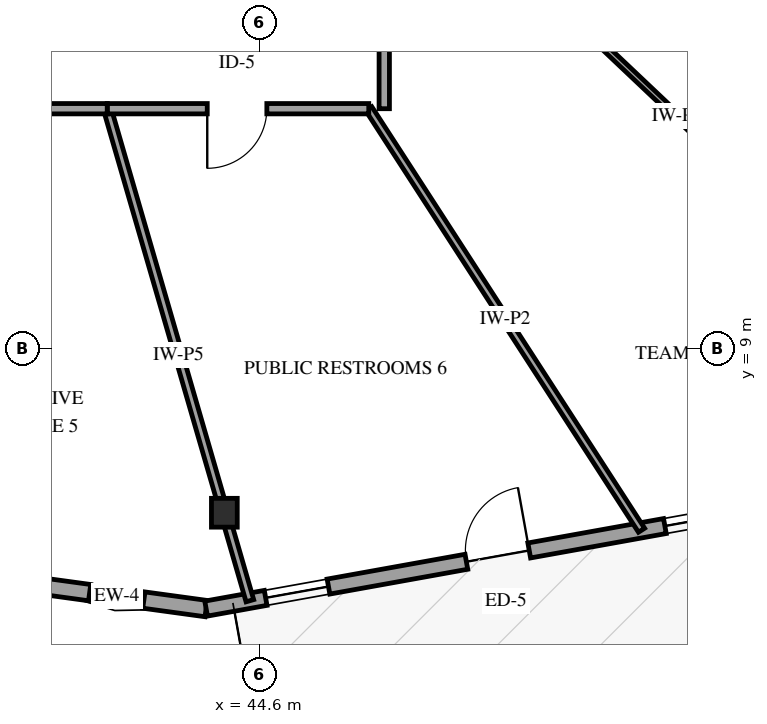
"""IFC4 building model, lengths in metres.
Left out: names, types, materials, properties, quantities, classifications, styles, units other than length and angle.
Written with IfcOpenShell. Run it as: python <this file> out.ifc"""

import sys

from ifc_helpers import new_model, si_unit, direction, frame, frame_2d, origin, origin_2d, place, context, subcontext, project, spatial, rectangle, i_section, extrude, element, fill, save


model = new_model("IFC4")
c1 = context("Model", 3, precision=1e-05, world=origin(), true_north=direction((0.0, 1.0)))
c2 = subcontext(c1, "Body", "Model", "MODEL_VIEW")
j1 = project(units=[si_unit("LENGTHUNIT", "METRE"), si_unit("PLANEANGLEUNIT", "RADIAN")], contexts=[c1])
p1 = place(None, origin())
s1 = spatial("IfcSite", under=j1, at=p1, CompositionType="ELEMENT")
p2 = place(p1, origin())
s2 = spatial("IfcBuilding", under=s1, at=p2, CompositionType="ELEMENT")
p3 = place(p2, frame((0.0, 0.0, 66.6)))
s3 = spatial("IfcBuildingStorey", under=s2, at=p3, CompositionType="ELEMENT", Elevation=66.6)
p4 = place(p3, frame((44.02, 6.306, 0.0), z_axis=(0.0, 0.0, 1.0), x_axis=(1.0, 0.0, 0.0)))
e1 = element("IfcColumn", 1, at=p4, inside=s3, PredefinedType="COLUMN", context=c2, shape_type="SweptSolid", body=[
    extrude(i_section(OverallWidth=0.424, OverallDepth=0.474, WebThickness=0.048, FlangeThickness=0.077, FilletRadius=0.038, at=origin_2d()), origin(), (0.0, 0.0, 1.0), 4.0),
])
p5 = place(p3, frame((40.781, 5.132, 0.0), z_axis=(0.0, 0.0, 1.0), x_axis=(0.990749365916, -0.13570443595, 0.0)))
e2 = element("IfcWall", 2, at=p5, inside=s3, PredefinedType="SOLIDWALL", context=c2, shape_type="SweptSolid", body=[
    extrude(rectangle(XDim=2.967, YDim=0.27, at=frame_2d((1.483, 0.0))), origin(), (0.0, 0.0, 1.0), 3.079),
])
p6 = place(p5, frame((1.033, 0.0, 0.75)))
e3 = element("IfcOpeningElement", 3, at=p6, cuts=e2, PredefinedType="OPENING", context=c2, shape_type="SweptSolid", body=[
    extrude(rectangle(XDim=0.9, YDim=1.5, at=frame_2d((0.45, 0.75))), frame((0.0, 0.145, 0.0), z_axis=(0.0, -1.0, 0.0), x_axis=(1.0, 0.0, 0.0)), (0.0, 0.0, 1.0), 0.29),
])
p7 = place(p3, frame((43.72, 4.729, 0.0), z_axis=(0.0, 0.0, 1.0), x_axis=(0.984196927588, 0.177077406028, 0.0)))
e4 = element("IfcWall", 4, at=p7, inside=s3, PredefinedType="SOLIDWALL", context=c2, shape_type="SweptSolid", body=[
    extrude(rectangle(XDim=9.698, YDim=0.25, at=frame_2d((4.849, 0.0))), origin(), (0.0, 0.0, 1.0), 3.079),
])
p8 = place(p7, frame((4.349, 0.0, 0.0)))
e5 = element("IfcOpeningElement", 5, at=p8, cuts=e4, PredefinedType="OPENING", context=c2, shape_type="SweptSolid", body=[
    extrude(rectangle(XDim=1.05, YDim=2.15, at=frame_2d((0.525, 1.075))), frame((0.0, 0.135, 0.0), z_axis=(0.0, -1.0, 0.0), x_axis=(1.0, 0.0, 0.0)), (0.0, 0.0, 1.0), 0.27),
])
p9 = place(p7, frame((0.995, 0.0, 0.72)))
e6 = element("IfcOpeningElement", 6, at=p9, cuts=e4, PredefinedType="OPENING", context=c2, shape_type="SweptSolid", body=[
    extrude(rectangle(XDim=1.05, YDim=1.55, at=frame_2d((0.525, 0.775))), frame((0.0, 0.135, 0.0), z_axis=(0.0, -1.0, 0.0), x_axis=(1.0, 0.0, 0.0)), (0.0, 0.0, 1.0), 0.27),
])
p10 = place(p7, frame((7.666, 0.0, 0.72)))
e7 = element("IfcOpeningElement", 7, at=p10, cuts=e4, PredefinedType="OPENING", context=c2, shape_type="SweptSolid", body=[
    extrude(rectangle(XDim=1.05, YDim=1.55, at=frame_2d((0.525, 0.775))), frame((0.0, 0.135, 0.0), z_axis=(0.0, -1.0, 0.0), x_axis=(1.0, 0.0, 0.0)), (0.0, 0.0, 1.0), 0.27),
])
p11 = place(p3, frame((46.65, 20.689, 0.0), z_axis=(0.0, 0.0, 1.0), x_axis=(0.881611431833, -0.471975935045, 0.0)))
e8 = element("IfcWall", 8, at=p11, inside=s3, PredefinedType="PARTITIONING", context=c2, shape_type="SweptSolid", body=[
    extrude(rectangle(XDim=16.147, YDim=0.12, at=frame_2d((8.073, 0.0))), origin(), (0.0, 0.0, 1.0), 3.7),
])
p12 = place(p3, frame((46.65, 17.385, 0.0), z_axis=(0.0, 0.0, 1.0), x_axis=(0.726403836212, -0.687268118522, 0.0)))
e9 = element("IfcWall", 9, at=p12, inside=s3, PredefinedType="PARTITIONING", context=c2, shape_type="SweptSolid", body=[
    extrude(rectangle(XDim=13.263, YDim=0.1, at=frame_2d((6.631, 0.0))), origin(), (0.0, 0.0, 1.0), 2.995),
])
p13 = place(p3, frame((42.094, 12.95, 0.0), z_axis=(0.0, 0.0, 1.0), x_axis=(0.278473925735, -0.960443789446, 0.0)))
e10 = element("IfcWall", 10, at=p13, inside=s3, PredefinedType="PARTITIONING", context=c2, shape_type="SweptSolid", body=[
    extrude(rectangle(XDim=8.424, YDim=0.13, at=frame_2d((4.212, 0.0))), origin(), (0.0, 0.0, 1.0), 2.995),
])
p14 = place(p3, frame((46.395, 12.95, 0.0), z_axis=(0.0, 0.0, 1.0), x_axis=(0.543315028439, -0.839528903536, 0.0)))
e11 = element("IfcWall", 11, at=p14, inside=s3, PredefinedType="PARTITIONING", context=c2, shape_type="SweptSolid", body=[
    extrude(rectangle(XDim=8.257, YDim=0.12, at=frame_2d((4.128, 0.0))), origin(), (0.0, 0.0, 1.0), 3.7),
])
p15 = place(p3, frame((46.65, 17.385, 0.0), z_axis=(0.0, 0.0, 1.0), x_axis=(0.0, -1.0, 0.0)))
e12 = element("IfcWall", 12, at=p15, inside=s3, PredefinedType="PARTITIONING", context=c2, shape_type="SweptSolid", body=[
    extrude(rectangle(XDim=4.435, YDim=0.17, at=frame_2d((2.218, 0.0))), origin(), (0.0, 0.0, 1.0), 3.7),
])
p16 = place(p15, frame((1.743, 0.0, 0.0)))
e13 = element("IfcOpeningElement", 13, at=p16, cuts=e12, PredefinedType="OPENING", context=c2, shape_type="SweptSolid", body=[
    extrude(rectangle(XDim=0.98, YDim=2.15, at=frame_2d((0.49, 1.075))), frame((0.0, 0.095, 0.0), z_axis=(0.0, -1.0, 0.0), x_axis=(1.0, 0.0, 0.0)), (0.0, 0.0, 1.0), 0.19),
])
p17 = place(p3, frame((46.395, 12.95, 0.0), z_axis=(0.0, 0.0, 1.0), x_axis=(-1.0, 0.0, 0.0)))
e14 = element("IfcWall", 14, at=p17, inside=s3, PredefinedType="PARTITIONING", context=c2, shape_type="SweptSolid", body=[
    extrude(rectangle(XDim=4.301, YDim=0.17, at=frame_2d((2.15, 0.0))), origin(), (0.0, 0.0, 1.0), 3.7),
])
p18 = place(p17, frame((1.676, 0.0, 0.0)))
e15 = element("IfcOpeningElement", 15, at=p18, cuts=e14, PredefinedType="OPENING", context=c2, shape_type="SweptSolid", body=[
    extrude(rectangle(XDim=0.98, YDim=2.15, at=frame_2d((0.49, 1.075))), frame((0.0, 0.095, 0.0), z_axis=(0.0, -1.0, 0.0), x_axis=(1.0, 0.0, 0.0)), (0.0, 0.0, 1.0), 0.19),
])
p19 = place(p3, frame((42.094, 12.95, 0.0), z_axis=(0.0, 0.0, 1.0), x_axis=(-1.0, 0.0, 0.0)))
e16 = element("IfcWall", 16, at=p19, inside=s3, PredefinedType="PARTITIONING", context=c2, shape_type="SweptSolid", body=[
    extrude(rectangle(XDim=3.475, YDim=0.17, at=frame_2d((1.738, 0.0))), origin(), (0.0, 0.0, 1.0), 3.7),
])
p20 = place(p19, frame((1.263, 0.0, 0.0)))
e17 = element("IfcOpeningElement", 17, at=p20, cuts=e16, PredefinedType="OPENING", context=c2, shape_type="SweptSolid", body=[
    extrude(rectangle(XDim=0.98, YDim=2.15, at=frame_2d((0.49, 1.075))), frame((0.0, 0.095, 0.0), z_axis=(0.0, -1.0, 0.0), x_axis=(1.0, 0.0, 0.0)), (0.0, 0.0, 1.0), 0.19),
])
p21 = place(p6, origin())
e18 = element("IfcWindow", 18, at=p21, inside=s3, PartitioningType="SINGLE_PANEL", PredefinedType="WINDOW", context=c2, shape_type="SweptSolid", body=[
    extrude(rectangle(XDim=0.9, YDim=1.5, at=frame_2d((0.45, 0.75))), frame((0.0, 0.03, 0.0), z_axis=(0.0, -1.0, 0.0), x_axis=(1.0, 0.0, 0.0)), (0.0, 0.0, 1.0), 0.06),
])
fill(e3, e18)
p22 = place(p8, origin())
e19 = element("IfcDoor", 19, at=p22, inside=s3, OperationType="SINGLE_SWING_RIGHT", PredefinedType="DOOR", context=c2, shape_type="SweptSolid", body=[
    extrude(rectangle(XDim=1.05, YDim=2.15, at=frame_2d((0.525, 1.075))), frame((0.0, 0.025, 0.0), z_axis=(0.0, -1.0, 0.0), x_axis=(1.0, 0.0, 0.0)), (0.0, 0.0, 1.0), 0.05),
])
fill(e5, e19)
p23 = place(p9, origin())
e20 = element("IfcWindow", 20, at=p23, inside=s3, PartitioningType="SINGLE_PANEL", PredefinedType="WINDOW", context=c2, shape_type="SweptSolid", body=[
    extrude(rectangle(XDim=1.05, YDim=1.55, at=frame_2d((0.525, 0.775))), frame((0.0, 0.03, 0.0), z_axis=(0.0, -1.0, 0.0), x_axis=(1.0, 0.0, 0.0)), (0.0, 0.0, 1.0), 0.06),
])
fill(e6, e20)
p24 = place(p10, origin())
e21 = element("IfcWindow", 21, at=p24, inside=s3, PartitioningType="SINGLE_PANEL", PredefinedType="WINDOW", context=c2, shape_type="SweptSolid", body=[
    extrude(rectangle(XDim=1.05, YDim=1.55, at=frame_2d((0.525, 0.775))), frame((0.0, 0.03, 0.0), z_axis=(0.0, -1.0, 0.0), x_axis=(1.0, 0.0, 0.0)), (0.0, 0.0, 1.0), 0.06),
])
fill(e7, e21)
p25 = place(p18, origin())
e22 = element("IfcDoor", 22, at=p25, inside=s3, OperationType="SINGLE_SWING_RIGHT", PredefinedType="DOOR", context=c2, shape_type="SweptSolid", body=[
    extrude(rectangle(XDim=0.98, YDim=2.15, at=frame_2d((0.49, 1.075))), frame((0.0, 0.025, 0.0), z_axis=(0.0, -1.0, 0.0), x_axis=(1.0, 0.0, 0.0)), (0.0, 0.0, 1.0), 0.05),
])
fill(e15, e22)
save(model, sys.argv[1])
